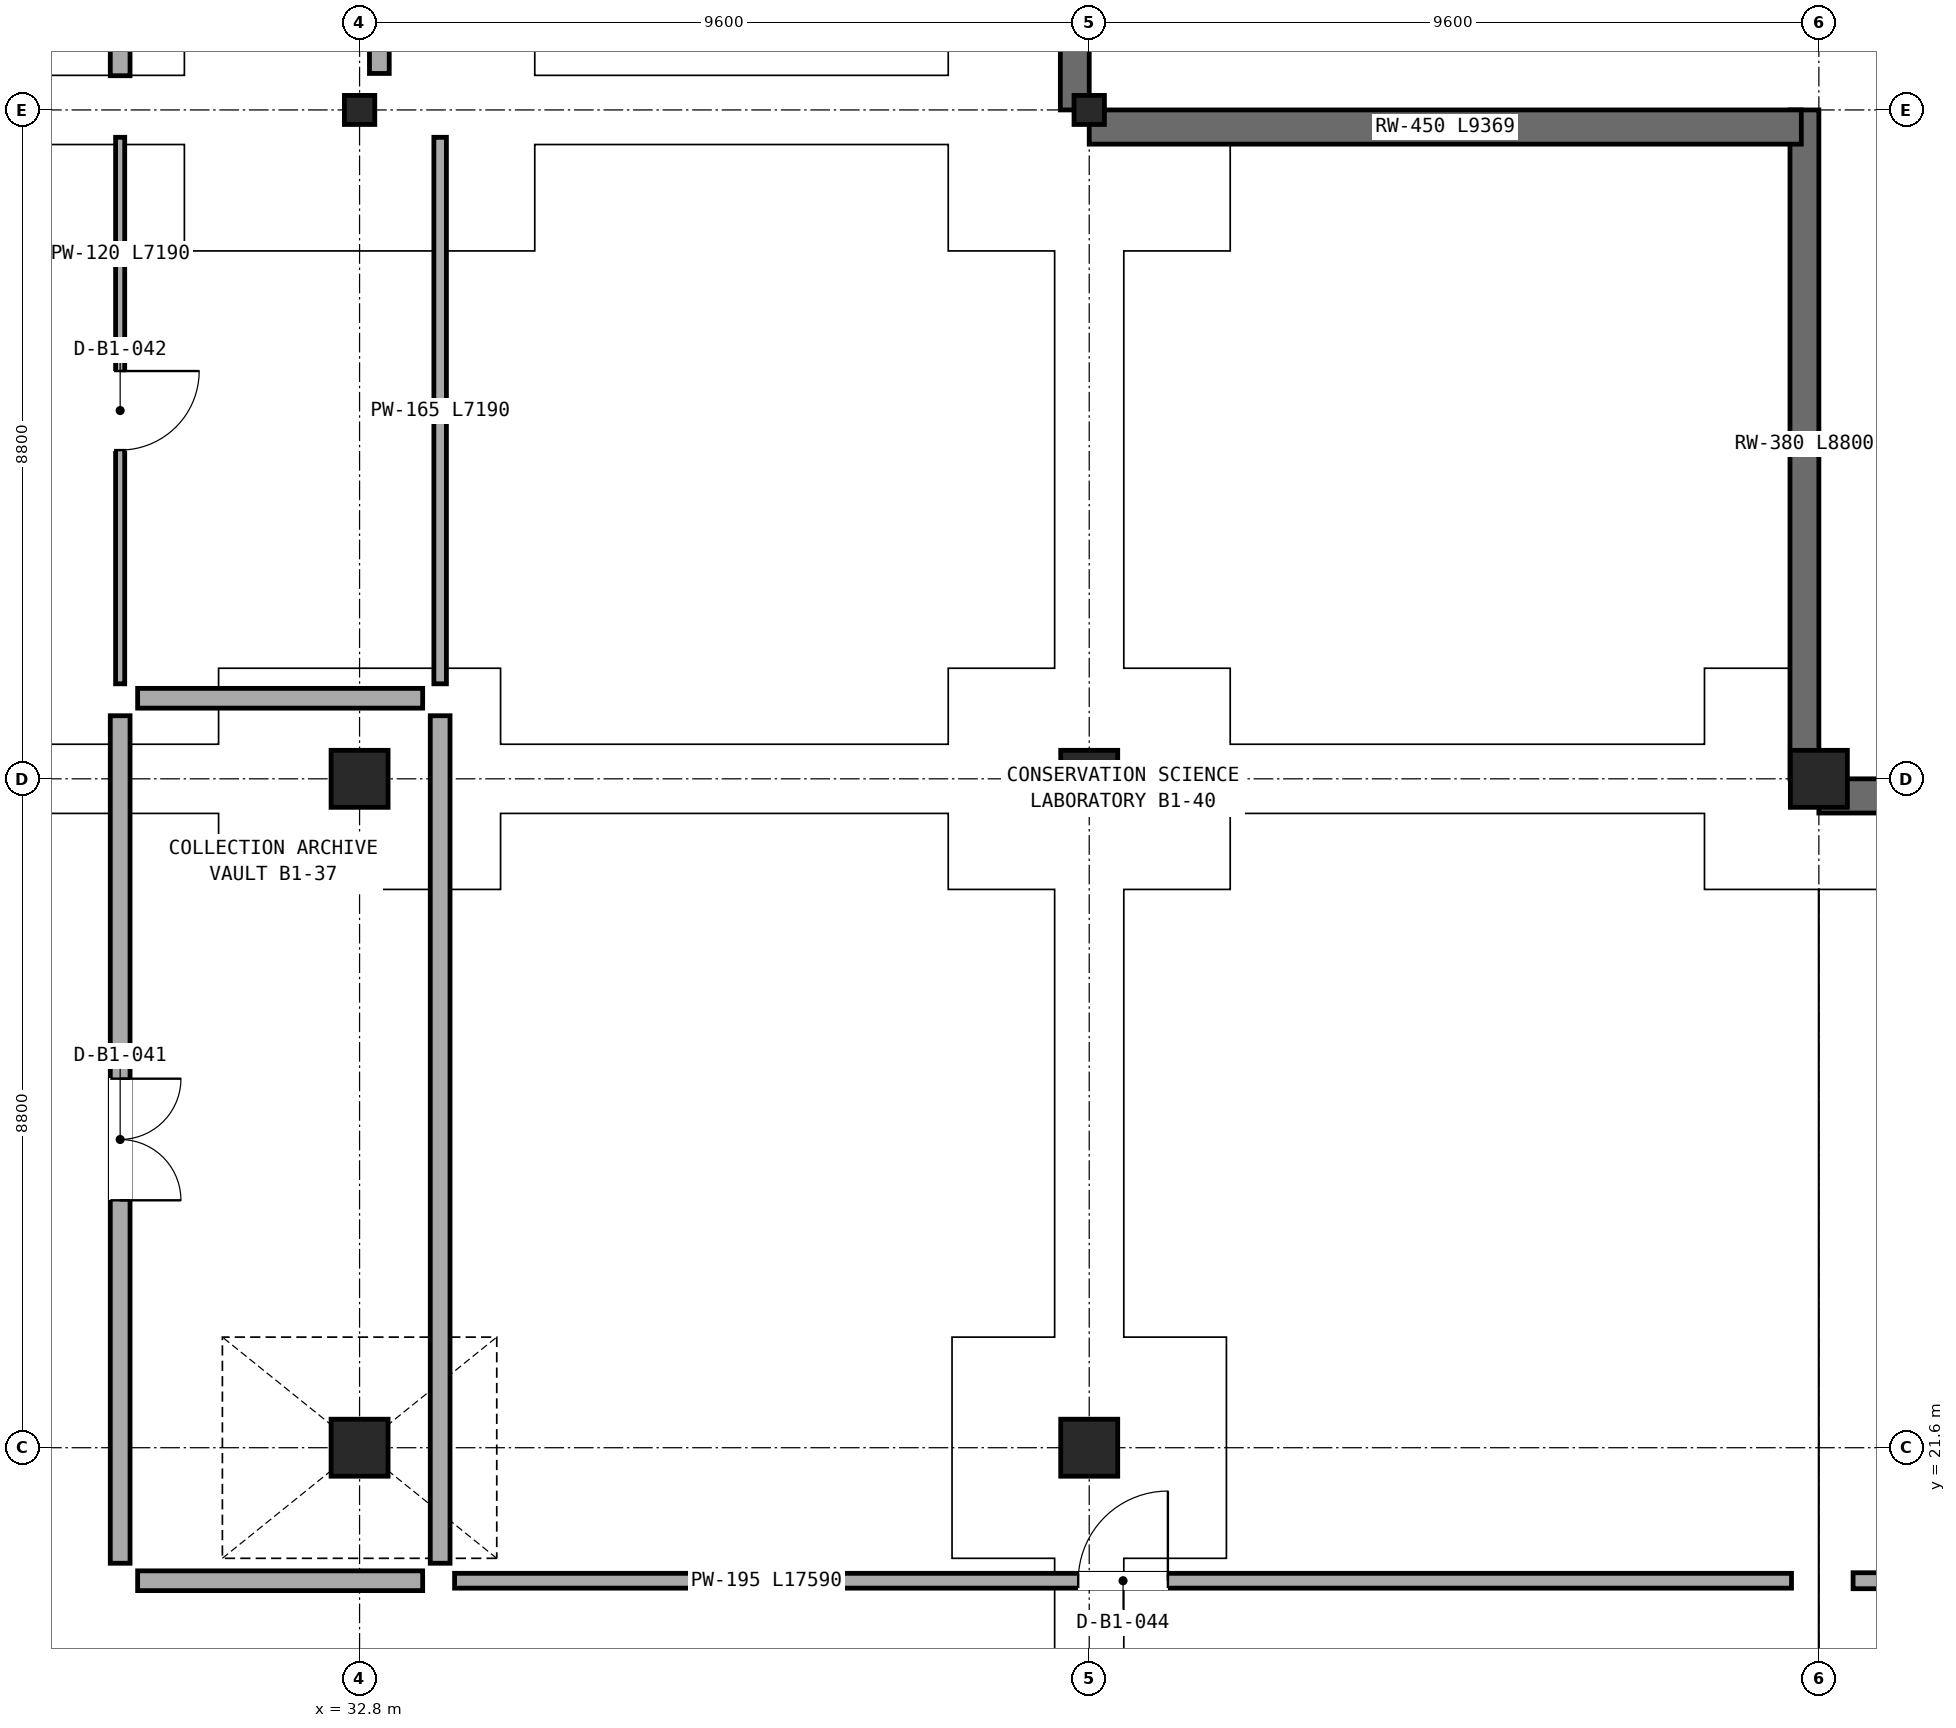
"""IFC4 building model, lengths in metres.
Left out: names, types, materials, properties, quantities, classifications, styles, units other than length and angle.
Written with IfcOpenShell. Run it as: python <this file> out.ifc"""

import sys

from ifc_helpers import new_model, si_unit, direction, frame, frame_2d, origin, origin_2d, place, context, subcontext, project, spatial, rectangle, i_section, extrude, element, fill, save


model = new_model("IFC4")
c1 = context("Model", 3, precision=1e-05, world=origin(), true_north=direction((0.0, 1.0)))
c2 = subcontext(c1, "Body", "Model", "MODEL_VIEW")
j1 = project(units=[si_unit("LENGTHUNIT", "METRE"), si_unit("PLANEANGLEUNIT", "RADIAN")], contexts=[c1])
p1 = place(None, origin())
s1 = spatial("IfcSite", under=j1, at=p1, CompositionType="ELEMENT")
p2 = place(p1, origin())
s2 = spatial("IfcBuilding", under=s1, at=p2, CompositionType="ELEMENT")
p3 = place(p2, frame((0.0, 0.0, -5.4)))
s3 = spatial("IfcBuildingStorey", under=s2, at=p3, CompositionType="ELEMENT", Elevation=-5.4)
for number, where, z_axis, x_axis in (
    (1, (32.8, 21.6, 0.0), (0.0, 0.0, 1.0), (1.0, 0.0, 0.0)),
    (2, (32.8, 30.4, 0.0), (0.0, 0.0, 1.0), (1.0, 0.0, 0.0)),
):
    element("IfcColumn", number, at=place(p3, frame(where, z_axis=z_axis, x_axis=x_axis)), inside=s3, PredefinedType="COLUMN", context=c2, shape_type="SweptSolid", body=[
        extrude(rectangle(XDim=0.75, YDim=0.75, at=origin_2d()), origin(), (0.0, 0.0, 1.0), 5.4),
    ])
p4 = place(p3, frame((32.8, 39.2, 0.0), z_axis=(0.0, 0.0, 1.0), x_axis=(1.0, 0.0, 0.0)))
e3 = element("IfcColumn", 3, at=p4, inside=s3, PredefinedType="COLUMN", context=c2, shape_type="SweptSolid", body=[
    extrude(i_section(OverallWidth=0.4, OverallDepth=0.382, WebThickness=0.025, FlangeThickness=0.036, at=origin_2d()), origin(), (0.0, 0.0, 1.0), 5.4),
])
for number, where, z_axis, x_axis in (
    (4, (42.4, 21.6, 0.0), (0.0, 0.0, 1.0), (1.0, 0.0, 0.0)),
    (5, (42.4, 30.4, 0.0), (0.0, 0.0, 1.0), (1.0, 0.0, 0.0)),
):
    element("IfcColumn", number, at=place(p3, frame(where, z_axis=z_axis, x_axis=x_axis)), inside=s3, PredefinedType="COLUMN", context=c2, shape_type="SweptSolid", body=[
        extrude(rectangle(XDim=0.75, YDim=0.75, at=origin_2d()), origin(), (0.0, 0.0, 1.0), 5.4),
    ])
p5 = place(p3, frame((42.4, 39.2, 0.0), z_axis=(0.0, 0.0, 1.0), x_axis=(1.0, 0.0, 0.0)))
e6 = element("IfcColumn", 6, at=p5, inside=s3, PredefinedType="COLUMN", context=c2, shape_type="SweptSolid", body=[
    extrude(i_section(OverallWidth=0.4, OverallDepth=0.382, WebThickness=0.025, FlangeThickness=0.036, at=origin_2d()), origin(), (0.0, 0.0, 1.0), 5.4),
])
p6 = place(p3, frame((52.0, 30.4, 0.0), z_axis=(0.0, 0.0, 1.0), x_axis=(1.0, 0.0, 0.0)))
e7 = element("IfcColumn", 7, at=p6, inside=s3, PredefinedType="COLUMN", context=c2, shape_type="SweptSolid", body=[
    extrude(rectangle(XDim=0.75, YDim=0.75, at=origin_2d()), origin(), (0.0, 0.0, 1.0), 5.4),
])
p7 = place(p3, frame((80.8, 30.175, 0.0), z_axis=(0.0, 0.0, 1.0), x_axis=(-1.0, 0.0, 0.0)))
e8 = element("IfcWall", 8, at=p7, inside=s3, PredefinedType="USERDEFINED", context=c2, shape_type="SweptSolid", body=[
    extrude(rectangle(XDim=28.8, YDim=0.45, at=frame_2d((14.4, 0.0))), origin(), (0.0, 0.0, 1.0), 5.06),
])
p8 = place(p3, frame((51.81, 30.4, 0.0), z_axis=(0.0, 0.0, 1.0), x_axis=(0.0, 1.0, 0.0)))
e9 = element("IfcWall", 9, at=p8, inside=s3, PredefinedType="USERDEFINED", context=c2, shape_type="SweptSolid", body=[
    extrude(rectangle(XDim=8.8, YDim=0.38, at=frame_2d((4.4, 0.0))), origin(), (0.0, 0.0, 1.0), 5.06),
])
p9 = place(p3, frame((51.769, 38.975, 0.0), z_axis=(0.0, 0.0, 1.0), x_axis=(-1.0, 0.0, 0.0)))
e10 = element("IfcWall", 10, at=p9, inside=s3, PredefinedType="USERDEFINED", context=c2, shape_type="SweptSolid", body=[
    extrude(rectangle(XDim=9.369, YDim=0.45, at=frame_2d((4.685, 0.0))), origin(), (0.0, 0.0, 1.0), 5.06),
])
p10 = place(p3, frame((42.21, 39.2, 0.0), z_axis=(0.0, 0.0, 1.0), x_axis=(0.0, 1.0, 0.0)))
e11 = element("IfcWall", 11, at=p10, inside=s3, PredefinedType="USERDEFINED", context=c2, shape_type="SweptSolid", body=[
    extrude(rectangle(XDim=35.2, YDim=0.38, at=frame_2d((17.6, 0.0))), origin(), (0.0, 0.0, 1.0), 5.06),
])
p11 = place(p3, frame((71.23, 19.85, 0.0), z_axis=(0.0, 0.0, 1.0), x_axis=(-1.0, 0.0, 0.0)))
e12 = element("IfcWall", 12, at=p11, inside=s3, PredefinedType="PARTITIONING", context=c2, shape_type="SweptSolid", body=[
    extrude(rectangle(XDim=18.78, YDim=0.21, at=frame_2d((9.39, 0.0))), origin(), (0.0, 0.0, 1.0), 5.03),
])
p12 = place(p11, frame((8.865, 0.0, 0.0)))
e13 = element("IfcOpeningElement", 13, at=p12, cuts=e12, PredefinedType="OPENING", context=c2, shape_type="SweptSolid", body=[
    extrude(rectangle(XDim=1.05, YDim=2.15, at=frame_2d((0.525, 1.075))), frame((0.0, 0.115, 0.0), z_axis=(0.0, -1.0, 0.0), x_axis=(1.0, 0.0, 0.0)), (0.0, 0.0, 1.0), 0.23),
])
p13 = place(p3, frame((29.65, 39.65, 0.0), z_axis=(0.0, 0.0, 1.0), x_axis=(0.0, 1.0, 0.0)))
e14 = element("IfcWall", 14, at=p13, inside=s3, PredefinedType="SOLIDWALL", context=c2, shape_type="SweptSolid", body=[
    extrude(rectangle(XDim=11.27, YDim=0.26, at=frame_2d((5.635, 0.0))), origin(), (0.0, 0.0, 1.0), 4.458),
])
p14 = place(p3, frame((29.65, 20.08, 0.0), z_axis=(0.0, 0.0, 1.0), x_axis=(0.0, 1.0, 0.0)))
e15 = element("IfcWall", 15, at=p14, inside=s3, PredefinedType="SOLIDWALL", context=c2, shape_type="SweptSolid", body=[
    extrude(rectangle(XDim=11.15, YDim=0.26, at=frame_2d((5.575, 0.0))), origin(), (0.0, 0.0, 1.0), 4.428),
])
p15 = place(p14, frame((4.775, 0.0, 0.0)))
e16 = element("IfcOpeningElement", 16, at=p15, cuts=e15, PredefinedType="OPENING", context=c2, shape_type="SweptSolid", body=[
    extrude(rectangle(XDim=1.6, YDim=2.4, at=frame_2d((0.8, 1.2))), frame((0.0, 0.14, 0.0), z_axis=(0.0, -1.0, 0.0), x_axis=(1.0, 0.0, 0.0)), (0.0, 0.0, 1.0), 0.28),
])
p16 = place(p3, frame((33.63, 19.85, 0.0), z_axis=(0.0, 0.0, 1.0), x_axis=(-1.0, 0.0, 0.0)))
e17 = element("IfcWall", 17, at=p16, inside=s3, PredefinedType="SOLIDWALL", context=c2, shape_type="SweptSolid", body=[
    extrude(rectangle(XDim=3.75, YDim=0.26, at=frame_2d((1.875, 0.0))), origin(), (0.0, 0.0, 1.0), 4.507),
])
p17 = place(p3, frame((29.65, 31.65, 0.0), z_axis=(0.0, 0.0, 1.0), x_axis=(0.0, 1.0, 0.0)))
e18 = element("IfcWall", 18, at=p17, inside=s3, PredefinedType="PARTITIONING", context=c2, shape_type="SweptSolid", body=[
    extrude(rectangle(XDim=7.19, YDim=0.12, at=frame_2d((3.595, 0.0))), origin(), (0.0, 0.0, 1.0), 5.03),
])
p18 = place(p17, frame((3.075, 0.0, 0.0)))
e19 = element("IfcOpeningElement", 19, at=p18, cuts=e18, PredefinedType="OPENING", context=c2, shape_type="SweptSolid", body=[
    extrude(rectangle(XDim=1.04, YDim=2.08, at=frame_2d((0.52, 1.04))), frame((0.0, 0.07, 0.0), z_axis=(0.0, -1.0, 0.0), x_axis=(1.0, 0.0, 0.0)), (0.0, 0.0, 1.0), 0.14),
])
p19 = place(p3, frame((51.64, 19.85, 0.0), z_axis=(0.0, 0.0, 1.0), x_axis=(-1.0, 0.0, 0.0)))
e20 = element("IfcWall", 20, at=p19, inside=s3, PredefinedType="PARTITIONING", context=c2, shape_type="SweptSolid", body=[
    extrude(rectangle(XDim=17.59, YDim=0.195, at=frame_2d((8.795, 0.0))), origin(), (0.0, 0.0, 1.0), 4.507),
])
p20 = place(p19, frame((8.205, 0.0, 0.0)))
e21 = element("IfcOpeningElement", 21, at=p20, cuts=e20, PredefinedType="OPENING", context=c2, shape_type="SweptSolid", body=[
    extrude(rectangle(XDim=1.18, YDim=2.08, at=frame_2d((0.59, 1.04))), frame((0.0, 0.107, 0.0), z_axis=(0.0, -1.0, 0.0), x_axis=(1.0, 0.0, 0.0)), (0.0, 0.0, 1.0), 0.215),
])
p21 = place(p3, frame((33.06, 50.92, 0.0), z_axis=(0.0, 0.0, 1.0), x_axis=(0.0, -1.0, 0.0)))
e22 = element("IfcWall", 22, at=p21, inside=s3, PredefinedType="SOLIDWALL", context=c2, shape_type="SweptSolid", body=[
    extrude(rectangle(XDim=11.24, YDim=0.26, at=frame_2d((5.62, 0.0))), origin(), (0.0, 0.0, 1.0), 4.458),
])
p22 = place(p3, frame((29.88, 31.46, 0.0), z_axis=(0.0, 0.0, 1.0), x_axis=(1.0, 0.0, 0.0)))
e23 = element("IfcWall", 23, at=p22, inside=s3, PredefinedType="SOLIDWALL", context=c2, shape_type="SweptSolid", body=[
    extrude(rectangle(XDim=3.75, YDim=0.26, at=frame_2d((1.875, 0.0))), origin(), (0.0, 0.0, 1.0), 4.507),
])
p23 = place(p3, frame((33.86, 31.23, 0.0), z_axis=(0.0, 0.0, 1.0), x_axis=(0.0, -1.0, 0.0)))
e24 = element("IfcWall", 24, at=p23, inside=s3, PredefinedType="SOLIDWALL", context=c2, shape_type="SweptSolid", body=[
    extrude(rectangle(XDim=11.15, YDim=0.26, at=frame_2d((5.575, 0.0))), origin(), (0.0, 0.0, 1.0), 4.428),
])
p24 = place(p3, frame((33.86, 38.84, 0.0), z_axis=(0.0, 0.0, 1.0), x_axis=(0.0, -1.0, 0.0)))
e25 = element("IfcWall", 25, at=p24, inside=s3, PredefinedType="PARTITIONING", context=c2, shape_type="SweptSolid", body=[
    extrude(rectangle(XDim=7.19, YDim=0.165, at=frame_2d((3.595, 0.0))), origin(), (0.0, 0.0, 1.0), 5.03),
])
p25 = place(p15, frame((1.6, 0.0, 0.0), z_axis=(0.0, 0.0, 1.0), x_axis=(-1.0, 0.0, 0.0)))
e26 = element("IfcDoor", 26, at=p25, inside=s3, OperationType="DOUBLE_DOOR_SINGLE_SWING", PredefinedType="DOOR", context=c2, shape_type="SweptSolid", body=[
    extrude(rectangle(XDim=1.6, YDim=2.4, at=frame_2d((0.8, 1.2))), frame((0.0, 0.025, 0.0), z_axis=(0.0, -1.0, 0.0), x_axis=(1.0, 0.0, 0.0)), (0.0, 0.0, 1.0), 0.05),
])
fill(e16, e26)
p26 = place(p18, frame((1.04, 0.0, 0.0), z_axis=(0.0, 0.0, 1.0), x_axis=(-1.0, 0.0, 0.0)))
e27 = element("IfcDoor", 27, at=p26, inside=s3, OperationType="SINGLE_SWING_RIGHT", PredefinedType="DOOR", context=c2, shape_type="SweptSolid", body=[
    extrude(rectangle(XDim=1.04, YDim=2.08, at=frame_2d((0.52, 1.04))), frame((0.0, 0.025, 0.0), z_axis=(0.0, -1.0, 0.0), x_axis=(1.0, 0.0, 0.0)), (0.0, 0.0, 1.0), 0.05),
])
fill(e19, e27)
p27 = place(p20, frame((1.18, 0.0, 0.0), z_axis=(0.0, 0.0, 1.0), x_axis=(-1.0, 0.0, 0.0)))
e28 = element("IfcDoor", 28, at=p27, inside=s3, OperationType="SINGLE_SWING_LEFT", PredefinedType="DOOR", context=c2, shape_type="SweptSolid", body=[
    extrude(rectangle(XDim=1.18, YDim=2.08, at=frame_2d((0.59, 1.04))), frame((0.0, 0.025, 0.0), z_axis=(0.0, -1.0, 0.0), x_axis=(1.0, 0.0, 0.0)), (0.0, 0.0, 1.0), 0.05),
])
fill(e21, e28)
save(model, sys.argv[1])
